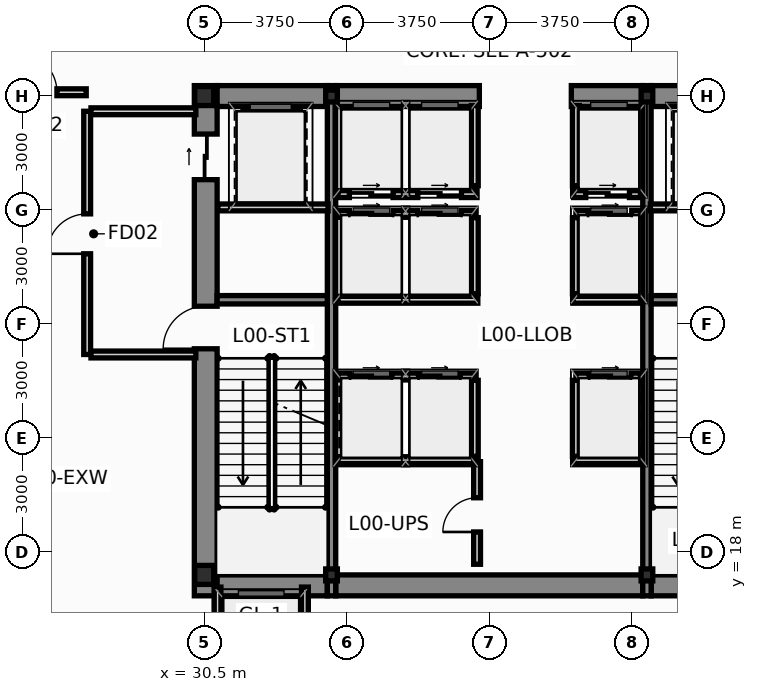
"""IFC4 building model, lengths in metres.
Left out: names, types, materials, properties, quantities, classifications, styles, units other than length and angle.
Written with IfcOpenShell. Run it as: python <this file> out.ifc"""

import sys

from ifc_helpers import new_model, si_unit, direction, frame, frame_2d, origin, origin_2d, place, context, subcontext, project, spatial, rectangle, i_section, extrude, source, transform, mapped, element, fill, save


model = new_model("IFC4")
c1 = context("Model", 3, precision=1e-05, world=origin(), true_north=direction((0.0, 1.0)))
c2 = subcontext(c1, "Body", "Model", "MODEL_VIEW")
j1 = project(units=[si_unit("LENGTHUNIT", "METRE"), si_unit("PLANEANGLEUNIT", "RADIAN")], contexts=[c1])
p1 = place(None, origin())
s1 = spatial("IfcSite", under=j1, at=p1, CompositionType="ELEMENT")
p2 = place(p1, origin())
s2 = spatial("IfcBuilding", under=s1, at=p2, CompositionType="ELEMENT")
p3 = place(p2, origin())
s3 = spatial("IfcBuildingStorey", under=s2, at=p3, CompositionType="ELEMENT", Elevation=0.0)
m1 = source(origin(), c2, "Body", "SweptSolid", [
    extrude(i_section(OverallWidth=0.5, OverallDepth=0.5, WebThickness=0.028, FlangeThickness=0.04, at=origin_2d()), origin(), (0.0, 0.0, 1.0), 5.4),
])
for number, where, z_axis, x_axis in (
    (1, (30.5, 17.4, 0.0), (0.0, 0.0, 1.0), (1.0, 0.0, 0.0)),
    (2, (30.5, 30.0, 0.0), (0.0, 0.0, 1.0), (1.0, 0.0, 0.0)),
):
    element("IfcColumn", number, at=place(p3, frame(where, z_axis=z_axis, x_axis=x_axis)), inside=s3, PredefinedType="COLUMN", context=c2, shape_type="MappedRepresentation", body=[
        mapped(m1, transform((0.0, 0.0, 0.0), scale=1.0)),
    ])
m2 = source(origin(), c2, "Body", "SweptSolid", [
    extrude(i_section(OverallWidth=0.307, OverallDepth=0.315, WebThickness=0.012, FlangeThickness=0.019, at=origin_2d()), origin(), (0.0, 0.0, 1.0), 5.4),
])
for number, where, z_axis, x_axis in (
    (3, (33.85, 17.4, 0.0), (0.0, 0.0, 1.0), (1.0, 0.0, 0.0)),
    (4, (42.15, 17.4, 0.0), (0.0, 0.0, 1.0), (1.0, 0.0, 0.0)),
    (5, (33.85, 30.0, 0.0), (0.0, 0.0, 1.0), (1.0, 0.0, 0.0)),
    (6, (42.15, 30.0, 0.0), (0.0, 0.0, 1.0), (1.0, 0.0, 0.0)),
):
    element("IfcColumn", number, at=place(p3, frame(where, z_axis=z_axis, x_axis=x_axis)), inside=s3, PredefinedType="COLUMN", context=c2, shape_type="MappedRepresentation", body=[
        mapped(m2, transform((0.0, 0.0, 0.0), scale=1.0)),
    ])
p4 = place(p3, frame((30.54, 16.85, 0.0), z_axis=(0.0, 0.0, 1.0), x_axis=(0.0, 1.0, 0.0)))
e7 = element("IfcWall", 7, at=p4, inside=s3, PredefinedType="SHEAR", context=c2, shape_type="SweptSolid", body=[
    extrude(rectangle(XDim=13.425, YDim=0.6, at=frame_2d((6.712, 0.0))), origin(), (0.0, 0.0, 1.0), 5.4),
])
p5 = place(p4, frame((6.5, 0.0, 0.0)))
e8 = element("IfcOpeningElement", 8, at=p5, cuts=e7, PredefinedType="OPENING", context=c2, shape_type="SweptSolid", body=[
    extrude(rectangle(XDim=1.12, YDim=2.15, at=frame_2d((0.56, 1.075))), frame((0.0, 0.312, 0.0), z_axis=(0.0, -1.0, 0.0), x_axis=(1.0, 0.0, 0.0)), (0.0, 0.0, 1.0), 0.624),
])
p6 = place(p4, frame((10.95, 0.0, 0.0)))
e9 = element("IfcOpeningElement", 9, at=p6, cuts=e7, PredefinedType="OPENING", context=c2, shape_type="SweptSolid", body=[
    extrude(rectangle(XDim=1.2, YDim=2.2, at=frame_2d((0.6, 1.1))), frame((0.0, 0.312, 0.0), z_axis=(0.0, -1.0, 0.0), x_axis=(1.0, 0.0, 0.0)), (0.0, 0.0, 1.0), 0.624),
])
p7 = place(p3, frame((30.84, 17.125, 0.0), z_axis=(0.0, 0.0, 1.0), x_axis=(1.0, 0.0, 0.0)))
e10 = element("IfcWall", 10, at=p7, inside=s3, PredefinedType="SHEAR", context=c2, shape_type="SweptSolid", body=[
    extrude(rectangle(XDim=2.9, YDim=0.55, at=frame_2d((1.45, 0.0))), origin(), (0.0, 0.0, 1.0), 5.4),
])
p8 = place(p3, frame((33.96, 17.125, 0.0), z_axis=(0.0, 0.0, 1.0), x_axis=(1.0, 0.0, 0.0)))
e11 = element("IfcWall", 11, at=p8, inside=s3, PredefinedType="SHEAR", context=c2, shape_type="SweptSolid", body=[
    extrude(rectangle(XDim=8.08, YDim=0.55, at=frame_2d((4.04, 0.0))), origin(), (0.0, 0.0, 1.0), 5.4),
])
for number, where, z_axis, x_axis in (
    (12, (42.26, 17.125, 0.0), (0.0, 0.0, 1.0), (1.0, 0.0, 0.0)),
    (13, (30.84, 30.0, 0.0), (0.0, 0.0, 1.0), (1.0, 0.0, 0.0)),
):
    element("IfcWall", number, at=place(p3, frame(where, z_axis=z_axis, x_axis=x_axis)), inside=s3, PredefinedType="SHEAR", context=c2, shape_type="SweptSolid", body=[
        extrude(rectangle(XDim=2.9, YDim=0.55, at=frame_2d((1.45, 0.0))), origin(), (0.0, 0.0, 1.0), 5.4),
    ])
p9 = place(p3, frame((33.96, 30.0, 0.0), z_axis=(0.0, 0.0, 1.0), x_axis=(1.0, 0.0, 0.0)))
e14 = element("IfcWall", 14, at=p9, inside=s3, PredefinedType="SHEAR", context=c2, shape_type="SweptSolid", body=[
    extrude(rectangle(XDim=3.78, YDim=0.55, at=frame_2d((1.89, 0.0))), origin(), (0.0, 0.0, 1.0), 5.4),
])
p10 = place(p3, frame((40.16, 30.0, 0.0), z_axis=(0.0, 0.0, 1.0), x_axis=(1.0, 0.0, 0.0)))
e15 = element("IfcWall", 15, at=p10, inside=s3, PredefinedType="SHEAR", context=c2, shape_type="SweptSolid", body=[
    extrude(rectangle(XDim=1.88, YDim=0.55, at=frame_2d((0.94, 0.0))), origin(), (0.0, 0.0, 1.0), 5.4),
])
p11 = place(p3, frame((42.26, 30.0, 0.0), z_axis=(0.0, 0.0, 1.0), x_axis=(1.0, 0.0, 0.0)))
e16 = element("IfcWall", 16, at=p11, inside=s3, PredefinedType="SHEAR", context=c2, shape_type="SweptSolid", body=[
    extrude(rectangle(XDim=2.9, YDim=0.55, at=frame_2d((1.45, 0.0))), origin(), (0.0, 0.0, 1.0), 5.4),
])
for number, where, z_axis, x_axis in (
    (17, (33.85, 16.85, 0.0), (0.0, 0.0, 1.0), (0.0, 1.0, 0.0)),
    (18, (42.15, 16.85, 0.0), (0.0, 0.0, 1.0), (0.0, 1.0, 0.0)),
):
    element("IfcWall", number, at=place(p3, frame(where, z_axis=z_axis, x_axis=x_axis)), inside=s3, PredefinedType="SHEAR", context=c2, shape_type="SweptSolid", body=[
        extrude(rectangle(XDim=13.425, YDim=0.22, at=frame_2d((6.712, 0.0))), origin(), (0.0, 0.0, 1.0), 5.4),
    ])
for number, where, z_axis, x_axis in (
    (19, (30.84, 24.64, 0.0), (0.0, 0.0, 1.0), (1.0, 0.0, 0.0)),
    (20, (42.26, 24.64, 0.0), (0.0, 0.0, 1.0), (1.0, 0.0, 0.0)),
):
    element("IfcWall", number, at=place(p3, frame(where, z_axis=z_axis, x_axis=x_axis)), inside=s3, PredefinedType="SHEAR", context=c2, shape_type="SweptSolid", body=[
        extrude(rectangle(XDim=2.9, YDim=0.22, at=frame_2d((1.45, 0.0))), origin(), (0.0, 0.0, 1.0), 5.4),
    ])
p12 = place(p3, frame((30.85, 14.42, 0.0), z_axis=(0.0, 0.0, 1.0), x_axis=(0.0, 1.0, 0.0)))
e21 = element("IfcWall", 21, at=p12, inside=s3, PredefinedType="PARTITIONING", context=c2, shape_type="SweptSolid", body=[
    extrude(rectangle(XDim=2.66, YDim=0.18, at=frame_2d((1.33, 0.0))), origin(), (0.0, 0.0, 1.0), 4.453),
])
p13 = place(p3, frame((33.15, 14.42, 0.0), z_axis=(0.0, 0.0, 1.0), x_axis=(0.0, 1.0, 0.0)))
e22 = element("IfcWall", 22, at=p13, inside=s3, PredefinedType="PARTITIONING", context=c2, shape_type="SweptSolid", body=[
    extrude(rectangle(XDim=2.66, YDim=0.18, at=frame_2d((1.33, 0.0))), origin(), (0.0, 0.0, 1.0), 5.08),
])
p14 = place(p3, frame((34.02, 22.62, 0.0), z_axis=(0.0, 0.0, 1.0), x_axis=(1.0, 0.0, 0.0)))
e23 = element("IfcWall", 23, at=p14, inside=s3, PredefinedType="PARTITIONING", context=c2, shape_type="SweptSolid", body=[
    extrude(rectangle(XDim=3.6, YDim=0.18, at=frame_2d((1.8, 0.0))), origin(), (0.0, 0.0, 1.0), 5.08),
])
p15 = place(p14, frame((0.32, 0.0, 0.0)))
e24 = element("IfcOpeningElement", 24, at=p15, cuts=e23, PredefinedType="OPENING", context=c2, shape_type="SweptSolid", body=[
    extrude(rectangle(XDim=1.1, YDim=2.2, at=frame_2d((0.55, 1.1))), frame((0.0, 0.102, 0.0), z_axis=(0.0, -1.0, 0.0), x_axis=(1.0, 0.0, 0.0)), (0.0, 0.0, 1.0), 0.204),
])
p16 = place(p14, frame((2.12, 0.0, 0.0)))
e25 = element("IfcOpeningElement", 25, at=p16, cuts=e23, PredefinedType="OPENING", context=c2, shape_type="SweptSolid", body=[
    extrude(rectangle(XDim=1.1, YDim=2.2, at=frame_2d((0.55, 1.1))), frame((0.0, 0.102, 0.0), z_axis=(0.0, -1.0, 0.0), x_axis=(1.0, 0.0, 0.0)), (0.0, 0.0, 1.0), 0.204),
])
p17 = place(p3, frame((40.28, 22.62, 0.0), z_axis=(0.0, 0.0, 1.0), x_axis=(1.0, 0.0, 0.0)))
e26 = element("IfcWall", 26, at=p17, inside=s3, PredefinedType="PARTITIONING", context=c2, shape_type="SweptSolid", body=[
    extrude(rectangle(XDim=1.7, YDim=0.18, at=frame_2d((0.85, 0.0))), origin(), (0.0, 0.0, 1.0), 5.08),
])
p18 = place(p17, frame((0.35, 0.0, 0.0)))
e27 = element("IfcOpeningElement", 27, at=p18, cuts=e26, PredefinedType="OPENING", context=c2, shape_type="SweptSolid", body=[
    extrude(rectangle(XDim=1.1, YDim=2.2, at=frame_2d((0.55, 1.1))), frame((0.0, 0.102, 0.0), z_axis=(0.0, -1.0, 0.0), x_axis=(1.0, 0.0, 0.0)), (0.0, 0.0, 1.0), 0.204),
])
for number, where, z_axis, x_axis in (
    (28, (37.62, 20.52, 0.0), (0.0, 0.0, 1.0), (0.0, 1.0, 0.0)),
    (29, (40.28, 20.52, 0.0), (0.0, 0.0, 1.0), (0.0, 1.0, 0.0)),
):
    element("IfcWall", number, at=place(p3, frame(where, z_axis=z_axis, x_axis=x_axis)), inside=s3, PredefinedType="PARTITIONING", context=c2, shape_type="SweptSolid", body=[
        extrude(rectangle(XDim=2.0, YDim=0.18, at=frame_2d((1.0, 0.0))), origin(), (0.0, 0.0, 1.0), 5.08),
    ])
p19 = place(p3, frame((34.02, 26.9, 0.0), z_axis=(0.0, 0.0, 1.0), x_axis=(1.0, 0.0, 0.0)))
e30 = element("IfcWall", 30, at=p19, inside=s3, PredefinedType="PARTITIONING", context=c2, shape_type="SweptSolid", body=[
    extrude(rectangle(XDim=3.6, YDim=0.18, at=frame_2d((1.8, 0.0))), origin(), (0.0, 0.0, 1.0), 5.08),
])
p20 = place(p19, frame((0.3, 0.0, 0.0)))
e31 = element("IfcOpeningElement", 31, at=p20, cuts=e30, PredefinedType="OPENING", context=c2, shape_type="SweptSolid", body=[
    extrude(rectangle(XDim=1.15, YDim=2.2, at=frame_2d((0.575, 1.1))), frame((0.0, 0.102, 0.0), z_axis=(0.0, -1.0, 0.0), x_axis=(1.0, 0.0, 0.0)), (0.0, 0.0, 1.0), 0.204),
])
p21 = place(p19, frame((2.1, 0.0, 0.0)))
e32 = element("IfcOpeningElement", 32, at=p21, cuts=e30, PredefinedType="OPENING", context=c2, shape_type="SweptSolid", body=[
    extrude(rectangle(XDim=1.15, YDim=2.2, at=frame_2d((0.575, 1.1))), frame((0.0, 0.102, 0.0), z_axis=(0.0, -1.0, 0.0), x_axis=(1.0, 0.0, 0.0)), (0.0, 0.0, 1.0), 0.204),
])
p22 = place(p3, frame((40.28, 26.9, 0.0), z_axis=(0.0, 0.0, 1.0), x_axis=(1.0, 0.0, 0.0)))
e33 = element("IfcWall", 33, at=p22, inside=s3, PredefinedType="PARTITIONING", context=c2, shape_type="SweptSolid", body=[
    extrude(rectangle(XDim=1.7, YDim=0.18, at=frame_2d((0.85, 0.0))), origin(), (0.0, 0.0, 1.0), 5.08),
])
p23 = place(p22, frame((0.32, 0.0, 0.0)))
e34 = element("IfcOpeningElement", 34, at=p23, cuts=e33, PredefinedType="OPENING", context=c2, shape_type="SweptSolid", body=[
    extrude(rectangle(XDim=1.15, YDim=2.2, at=frame_2d((0.575, 1.1))), frame((0.0, 0.102, 0.0), z_axis=(0.0, -1.0, 0.0), x_axis=(1.0, 0.0, 0.0)), (0.0, 0.0, 1.0), 0.204),
])
for number, where, z_axis, x_axis in (
    (35, (37.62, 24.8, 0.0), (0.0, 0.0, 1.0), (0.0, 1.0, 0.0)),
    (36, (40.28, 24.8, 0.0), (0.0, 0.0, 1.0), (0.0, 1.0, 0.0)),
):
    element("IfcWall", number, at=place(p3, frame(where, z_axis=z_axis, x_axis=x_axis)), inside=s3, PredefinedType="PARTITIONING", context=c2, shape_type="SweptSolid", body=[
        extrude(rectangle(XDim=2.0, YDim=0.18, at=frame_2d((1.0, 0.0))), origin(), (0.0, 0.0, 1.0), 5.08),
    ])
p24 = place(p3, frame((34.02, 24.64, 0.0), z_axis=(0.0, 0.0, 1.0), x_axis=(1.0, 0.0, 0.0)))
e37 = element("IfcWall", 37, at=p24, inside=s3, PredefinedType="PARTITIONING", context=c2, shape_type="SweptSolid", body=[
    extrude(rectangle(XDim=3.68, YDim=0.18, at=frame_2d((1.84, 0.0))), origin(), (0.0, 0.0, 1.0), 5.08),
])
p25 = place(p3, frame((40.2, 24.64, 0.0), z_axis=(0.0, 0.0, 1.0), x_axis=(1.0, 0.0, 0.0)))
e38 = element("IfcWall", 38, at=p25, inside=s3, PredefinedType="PARTITIONING", context=c2, shape_type="SweptSolid", body=[
    extrude(rectangle(XDim=1.78, YDim=0.18, at=frame_2d((0.89, 0.0))), origin(), (0.0, 0.0, 1.0), 5.08),
])
p26 = place(p3, frame((34.02, 27.42, 0.0), z_axis=(0.0, 0.0, 1.0), x_axis=(1.0, 0.0, 0.0)))
e39 = element("IfcWall", 39, at=p26, inside=s3, PredefinedType="PARTITIONING", context=c2, shape_type="SweptSolid", body=[
    extrude(rectangle(XDim=3.66, YDim=0.18, at=frame_2d((1.83, 0.0))), origin(), (0.0, 0.0, 1.0), 5.08),
])
p27 = place(p26, frame((0.3, 0.0, 0.0)))
e40 = element("IfcOpeningElement", 40, at=p27, cuts=e39, PredefinedType="OPENING", context=c2, shape_type="SweptSolid", body=[
    extrude(rectangle(XDim=1.15, YDim=2.2, at=frame_2d((0.575, 1.1))), frame((0.0, 0.102, 0.0), z_axis=(0.0, -1.0, 0.0), x_axis=(1.0, 0.0, 0.0)), (0.0, 0.0, 1.0), 0.204),
])
p28 = place(p26, frame((2.1, 0.0, 0.0)))
e41 = element("IfcOpeningElement", 41, at=p28, cuts=e39, PredefinedType="OPENING", context=c2, shape_type="SweptSolid", body=[
    extrude(rectangle(XDim=1.15, YDim=2.2, at=frame_2d((0.575, 1.1))), frame((0.0, 0.102, 0.0), z_axis=(0.0, -1.0, 0.0), x_axis=(1.0, 0.0, 0.0)), (0.0, 0.0, 1.0), 0.204),
])
p29 = place(p3, frame((40.22, 27.42, 0.0), z_axis=(0.0, 0.0, 1.0), x_axis=(1.0, 0.0, 0.0)))
e42 = element("IfcWall", 42, at=p29, inside=s3, PredefinedType="PARTITIONING", context=c2, shape_type="SweptSolid", body=[
    extrude(rectangle(XDim=1.76, YDim=0.18, at=frame_2d((0.88, 0.0))), origin(), (0.0, 0.0, 1.0), 5.08),
])
p30 = place(p29, frame((0.32, 0.0, 0.0)))
e43 = element("IfcOpeningElement", 43, at=p30, cuts=e42, PredefinedType="OPENING", context=c2, shape_type="SweptSolid", body=[
    extrude(rectangle(XDim=1.15, YDim=2.2, at=frame_2d((0.575, 1.1))), frame((0.0, 0.102, 0.0), z_axis=(0.0, -1.0, 0.0), x_axis=(1.0, 0.0, 0.0)), (0.0, 0.0, 1.0), 0.204),
])
for number, where, z_axis, x_axis in (
    (44, (37.62, 27.64, 0.0), (0.0, 0.0, 1.0), (0.0, 1.0, 0.0)),
    (45, (40.28, 27.64, 0.0), (0.0, 0.0, 1.0), (0.0, 1.0, 0.0)),
):
    element("IfcWall", number, at=place(p3, frame(where, z_axis=z_axis, x_axis=x_axis)), inside=s3, PredefinedType="PARTITIONING", context=c2, shape_type="SweptSolid", body=[
        extrude(rectangle(XDim=2.11, YDim=0.18, at=frame_2d((1.055, 0.0))), origin(), (0.0, 0.0, 1.0), 5.08),
    ])
p31 = place(p3, frame((27.42, 23.2, 0.0), z_axis=(0.0, 0.0, 1.0), x_axis=(0.0, 1.0, 0.0)))
e46 = element("IfcWall", 46, at=p31, inside=s3, PredefinedType="PARTITIONING", context=c2, shape_type="SweptSolid", body=[
    extrude(rectangle(XDim=6.4, YDim=0.18, at=frame_2d((3.2, 0.0))), origin(), (0.0, 0.0, 1.0), 4.706),
])
p32 = place(p31, frame((2.65, 0.0, 0.0)))
e47 = element("IfcOpeningElement", 47, at=p32, cuts=e46, PredefinedType="OPENING", context=c2, shape_type="SweptSolid", body=[
    extrude(rectangle(XDim=1.05, YDim=2.15, at=frame_2d((0.525, 1.075))), frame((0.0, 0.102, 0.0), z_axis=(0.0, -1.0, 0.0), x_axis=(1.0, 0.0, 0.0)), (0.0, 0.0, 1.0), 0.204),
])
p33 = place(p3, frame((27.52, 23.2, 0.0), z_axis=(0.0, 0.0, 1.0), x_axis=(1.0, 0.0, 0.0)))
e48 = element("IfcWall", 48, at=p33, inside=s3, PredefinedType="PARTITIONING", context=c2, shape_type="SweptSolid", body=[
    extrude(rectangle(XDim=2.76, YDim=0.18, at=frame_2d((1.38, 0.0))), origin(), (0.0, 0.0, 1.0), 5.08),
])
p34 = place(p3, frame((27.52, 29.6, 0.0), z_axis=(0.0, 0.0, 1.0), x_axis=(1.0, 0.0, 0.0)))
e49 = element("IfcWall", 49, at=p34, inside=s3, PredefinedType="PARTITIONING", context=c2, shape_type="SweptSolid", body=[
    extrude(rectangle(XDim=2.76, YDim=0.18, at=frame_2d((1.38, 0.0))), origin(), (0.0, 0.0, 1.0), 4.453),
])
for number, where, z_axis, x_axis in (
    (50, (30.86, 27.07, 0.0), (0.0, 0.0, 1.0), (1.0, 0.0, 0.0)),
    (51, (42.24, 27.07, 0.0), (0.0, 0.0, 1.0), (1.0, 0.0, 0.0)),
):
    element("IfcWall", number, at=place(p3, frame(where, z_axis=z_axis, x_axis=x_axis)), inside=s3, PredefinedType="PARTITIONING", context=c2, shape_type="SweptSolid", body=[
        extrude(rectangle(XDim=2.9, YDim=0.18, at=frame_2d((1.45, 0.0))), origin(), (0.0, 0.0, 1.0), 5.08),
    ])
p35 = place(p3, frame((34.02, 20.42, 0.0), z_axis=(0.0, 0.0, 1.0), x_axis=(1.0, 0.0, 0.0)))
e52 = element("IfcWall", 52, at=p35, inside=s3, PredefinedType="PARTITIONING", context=c2, shape_type="SweptSolid", body=[
    extrude(rectangle(XDim=3.64, YDim=0.18, at=frame_2d((1.82, 0.0))), origin(), (0.0, 0.0, 1.0), 5.08),
])
p36 = place(p3, frame((40.22, 20.42, 0.0), z_axis=(0.0, 0.0, 1.0), x_axis=(1.0, 0.0, 0.0)))
e53 = element("IfcWall", 53, at=p36, inside=s3, PredefinedType="PARTITIONING", context=c2, shape_type="SweptSolid", body=[
    extrude(rectangle(XDim=1.76, YDim=0.18, at=frame_2d((0.88, 0.0))), origin(), (0.0, 0.0, 1.0), 5.08),
])
p37 = place(p3, frame((37.68, 17.68, 0.0), z_axis=(0.0, 0.0, 1.0), x_axis=(0.0, 1.0, 0.0)))
e54 = element("IfcWall", 54, at=p37, inside=s3, PredefinedType="PARTITIONING", context=c2, shape_type="SweptSolid", body=[
    extrude(rectangle(XDim=2.7, YDim=0.18, at=frame_2d((1.35, 0.0))), origin(), (0.0, 0.0, 1.0), 5.08),
])
p38 = place(p37, frame((0.85, 0.0, 0.0)))
e55 = element("IfcOpeningElement", 55, at=p38, cuts=e54, PredefinedType="OPENING", context=c2, shape_type="SweptSolid", body=[
    extrude(rectangle(XDim=0.9, YDim=2.1, at=frame_2d((0.45, 1.05))), frame((0.0, 0.102, 0.0), z_axis=(0.0, -1.0, 0.0), x_axis=(1.0, 0.0, 0.0)), (0.0, 0.0, 1.0), 0.204),
])
p39 = place(p3, frame((24.805, 30.1, 0.0), z_axis=(0.0, 0.0, 1.0), x_axis=(1.0, 0.0, 0.0)))
e56 = element("IfcWall", 56, at=p39, inside=s3, PredefinedType="PARTITIONING", context=c2, shape_type="SweptSolid", body=[
    extrude(rectangle(XDim=2.59, YDim=0.18, at=frame_2d((1.295, 0.0))), origin(), (0.0, 0.0, 1.0), 4.453),
])
p40 = place(p39, frame((0.77, 0.0, 0.0)))
e57 = element("IfcOpeningElement", 57, at=p40, cuts=e56, PredefinedType="OPENING", context=c2, shape_type="SweptSolid", body=[
    extrude(rectangle(XDim=1.05, YDim=2.15, at=frame_2d((0.525, 1.075))), frame((0.0, 0.102, 0.0), z_axis=(0.0, -1.0, 0.0), x_axis=(1.0, 0.0, 0.0)), (0.0, 0.0, 1.0), 0.204),
])
p41 = place(p5, origin())
e58 = element("IfcDoor", 58, at=p41, inside=s3, OperationType="SINGLE_SWING_LEFT", PredefinedType="DOOR", context=c2, shape_type="SweptSolid", body=[
    extrude(rectangle(XDim=1.12, YDim=2.15, at=frame_2d((0.56, 1.075))), frame((0.0, 0.025, 0.0), z_axis=(0.0, -1.0, 0.0), x_axis=(1.0, 0.0, 0.0)), (0.0, 0.0, 1.0), 0.05),
])
fill(e8, e58)
p42 = place(p6, origin())
e59 = element("IfcDoor", 59, at=p42, inside=s3, OperationType="SLIDING_TO_LEFT", PredefinedType="DOOR", context=c2, shape_type="SweptSolid", body=[
    extrude(rectangle(XDim=1.2, YDim=2.2, at=frame_2d((0.6, 1.1))), frame((0.0, 0.025, 0.0), z_axis=(0.0, -1.0, 0.0), x_axis=(1.0, 0.0, 0.0)), (0.0, 0.0, 1.0), 0.05),
])
fill(e9, e59)
p43 = place(p15, origin())
e60 = element("IfcDoor", 60, at=p43, inside=s3, OperationType="SLIDING_TO_LEFT", PredefinedType="DOOR", context=c2, shape_type="SweptSolid", body=[
    extrude(rectangle(XDim=1.1, YDim=2.2, at=frame_2d((0.55, 1.1))), frame((0.0, 0.025, 0.0), z_axis=(0.0, -1.0, 0.0), x_axis=(1.0, 0.0, 0.0)), (0.0, 0.0, 1.0), 0.05),
])
fill(e24, e60)
p44 = place(p16, origin())
e61 = element("IfcDoor", 61, at=p44, inside=s3, OperationType="SLIDING_TO_RIGHT", PredefinedType="DOOR", context=c2, shape_type="SweptSolid", body=[
    extrude(rectangle(XDim=1.1, YDim=2.2, at=frame_2d((0.55, 1.1))), frame((0.0, 0.025, 0.0), z_axis=(0.0, -1.0, 0.0), x_axis=(1.0, 0.0, 0.0)), (0.0, 0.0, 1.0), 0.05),
])
fill(e25, e61)
p45 = place(p18, origin())
e62 = element("IfcDoor", 62, at=p45, inside=s3, OperationType="SLIDING_TO_LEFT", PredefinedType="DOOR", context=c2, shape_type="SweptSolid", body=[
    extrude(rectangle(XDim=1.1, YDim=2.2, at=frame_2d((0.55, 1.1))), frame((0.0, 0.025, 0.0), z_axis=(0.0, -1.0, 0.0), x_axis=(1.0, 0.0, 0.0)), (0.0, 0.0, 1.0), 0.05),
])
fill(e27, e62)
p46 = place(p20, origin())
e63 = element("IfcDoor", 63, at=p46, inside=s3, OperationType="SLIDING_TO_LEFT", PredefinedType="DOOR", context=c2, shape_type="SweptSolid", body=[
    extrude(rectangle(XDim=1.15, YDim=2.2, at=frame_2d((0.575, 1.1))), frame((0.0, 0.025, 0.0), z_axis=(0.0, -1.0, 0.0), x_axis=(1.0, 0.0, 0.0)), (0.0, 0.0, 1.0), 0.05),
])
fill(e31, e63)
p47 = place(p21, origin())
e64 = element("IfcDoor", 64, at=p47, inside=s3, OperationType="SLIDING_TO_RIGHT", PredefinedType="DOOR", context=c2, shape_type="SweptSolid", body=[
    extrude(rectangle(XDim=1.15, YDim=2.2, at=frame_2d((0.575, 1.1))), frame((0.0, 0.025, 0.0), z_axis=(0.0, -1.0, 0.0), x_axis=(1.0, 0.0, 0.0)), (0.0, 0.0, 1.0), 0.05),
])
fill(e32, e64)
p48 = place(p23, origin())
e65 = element("IfcDoor", 65, at=p48, inside=s3, OperationType="SLIDING_TO_LEFT", PredefinedType="DOOR", context=c2, shape_type="SweptSolid", body=[
    extrude(rectangle(XDim=1.15, YDim=2.2, at=frame_2d((0.575, 1.1))), frame((0.0, 0.025, 0.0), z_axis=(0.0, -1.0, 0.0), x_axis=(1.0, 0.0, 0.0)), (0.0, 0.0, 1.0), 0.05),
])
fill(e34, e65)
p49 = place(p27, origin())
e66 = element("IfcDoor", 66, at=p49, inside=s3, OperationType="SLIDING_TO_RIGHT", PredefinedType="DOOR", context=c2, shape_type="SweptSolid", body=[
    extrude(rectangle(XDim=1.15, YDim=2.2, at=frame_2d((0.575, 1.1))), frame((0.0, 0.025, 0.0), z_axis=(0.0, -1.0, 0.0), x_axis=(1.0, 0.0, 0.0)), (0.0, 0.0, 1.0), 0.05),
])
fill(e40, e66)
p50 = place(p28, origin())
e67 = element("IfcDoor", 67, at=p50, inside=s3, OperationType="SLIDING_TO_LEFT", PredefinedType="DOOR", context=c2, shape_type="SweptSolid", body=[
    extrude(rectangle(XDim=1.15, YDim=2.2, at=frame_2d((0.575, 1.1))), frame((0.0, 0.025, 0.0), z_axis=(0.0, -1.0, 0.0), x_axis=(1.0, 0.0, 0.0)), (0.0, 0.0, 1.0), 0.05),
])
fill(e41, e67)
p51 = place(p30, origin())
e68 = element("IfcDoor", 68, at=p51, inside=s3, OperationType="SLIDING_TO_RIGHT", PredefinedType="DOOR", context=c2, shape_type="SweptSolid", body=[
    extrude(rectangle(XDim=1.15, YDim=2.2, at=frame_2d((0.575, 1.1))), frame((0.0, 0.025, 0.0), z_axis=(0.0, -1.0, 0.0), x_axis=(1.0, 0.0, 0.0)), (0.0, 0.0, 1.0), 0.05),
])
fill(e43, e68)
p52 = place(p32, origin())
e69 = element("IfcDoor", 69, at=p52, inside=s3, OperationType="SINGLE_SWING_LEFT", PredefinedType="DOOR", context=c2, shape_type="SweptSolid", body=[
    extrude(rectangle(XDim=1.05, YDim=2.15, at=frame_2d((0.525, 1.075))), frame((0.0, 0.025, 0.0), z_axis=(0.0, -1.0, 0.0), x_axis=(1.0, 0.0, 0.0)), (0.0, 0.0, 1.0), 0.05),
])
fill(e47, e69)
p53 = place(p38, origin())
e70 = element("IfcDoor", 70, at=p53, inside=s3, OperationType="SINGLE_SWING_LEFT", PredefinedType="DOOR", context=c2, shape_type="SweptSolid", body=[
    extrude(rectangle(XDim=0.9, YDim=2.1, at=frame_2d((0.45, 1.05))), frame((0.0, 0.025, 0.0), z_axis=(0.0, -1.0, 0.0), x_axis=(1.0, 0.0, 0.0)), (0.0, 0.0, 1.0), 0.05),
])
fill(e55, e70)
p54 = place(p40, origin())
e71 = element("IfcDoor", 71, at=p54, inside=s3, OperationType="SINGLE_SWING_LEFT", PredefinedType="DOOR", context=c2, shape_type="SweptSolid", body=[
    extrude(rectangle(XDim=1.05, YDim=2.15, at=frame_2d((0.525, 1.075))), frame((0.0, 0.025, 0.0), z_axis=(0.0, -1.0, 0.0), x_axis=(1.0, 0.0, 0.0)), (0.0, 0.0, 1.0), 0.05),
])
fill(e57, e71)
save(model, sys.argv[1])
